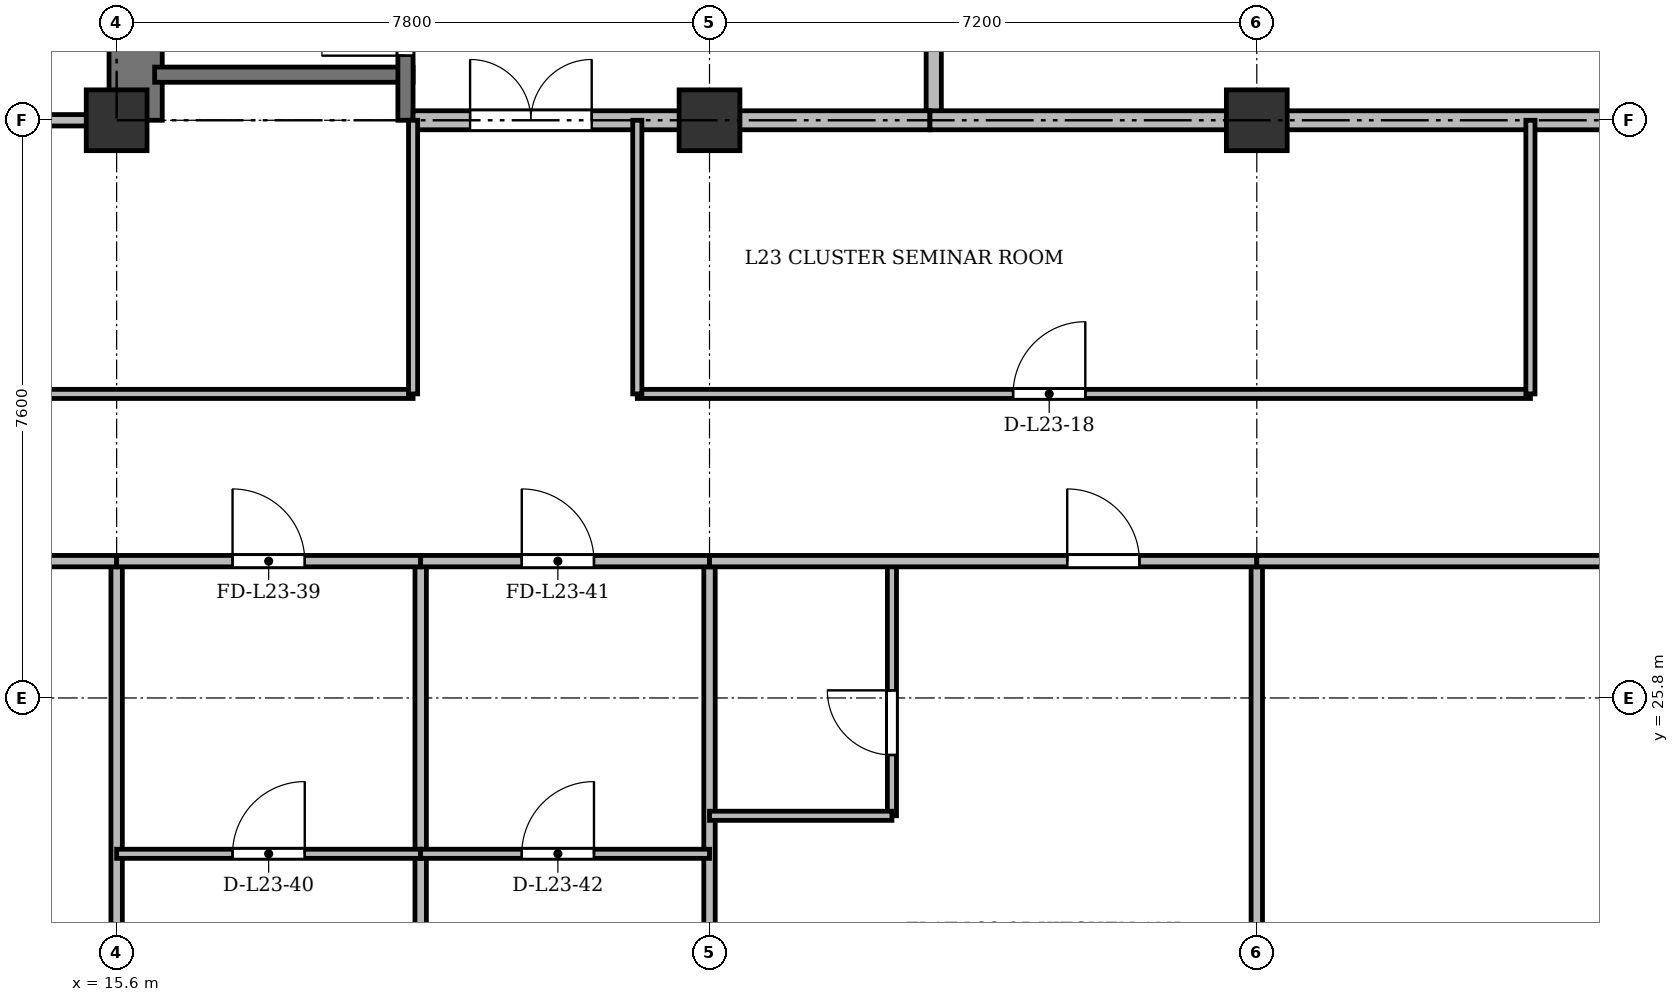
"""IFC4 building model, lengths in metres.
Left out: names, types, materials, properties, quantities, classifications, styles, units other than length and angle.
Written with IfcOpenShell. Run it as: python <this file> out.ifc"""

import sys

from ifc_helpers import new_model, si_unit, direction, frame, frame_2d, origin, origin_2d, place, context, subcontext, project, spatial, rectangle, extrude, source, transform, mapped, element, fill, save


model = new_model("IFC4")
c1 = context("Model", 3, precision=1e-05, world=origin(), true_north=direction((0.0, 1.0)))
c2 = subcontext(c1, "Body", "Model", "MODEL_VIEW")
j1 = project(units=[si_unit("LENGTHUNIT", "METRE"), si_unit("PLANEANGLEUNIT", "RADIAN")], contexts=[c1])
p1 = place(None, origin())
s1 = spatial("IfcSite", under=j1, at=p1, CompositionType="ELEMENT")
p2 = place(p1, origin())
s2 = spatial("IfcBuilding", under=s1, at=p2, CompositionType="ELEMENT")
p3 = place(p2, frame((0.0, 0.0, 92.5)))
s3 = spatial("IfcBuildingStorey", under=s2, at=p3, CompositionType="ELEMENT", Elevation=92.5)
m1 = source(origin(), c2, "Body", "SweptSolid", [
    extrude(rectangle(XDim=0.8, YDim=0.8, at=origin_2d()), origin(), (0.0, 0.0, 1.0), 3.6),
])
for number, where, z_axis, x_axis in (
    (1, (15.6, 33.4, 0.0), (0.0, 0.0, 1.0), (1.0, 0.0, 0.0)),
    (2, (23.4, 33.4, 0.0), (0.0, 0.0, 1.0), (1.0, 0.0, 0.0)),
    (3, (30.6, 33.4, 0.0), (0.0, 0.0, 1.0), (1.0, 0.0, 0.0)),
):
    element("IfcColumn", number, at=place(p3, frame(where, z_axis=z_axis, x_axis=x_axis)), inside=s3, PredefinedType="COLUMN", context=c2, shape_type="MappedRepresentation", body=[
        mapped(m1, transform((0.0, 0.0, 0.0), x_axis=(1.0, 0.0, 0.0), y_axis=(0.0, 1.0, 0.0), z_axis=(0.0, 0.0, 1.0), scale=1.0)),
    ])
p4 = place(p3, frame((15.85, 33.4, 0.0), z_axis=(0.0, 0.0, 1.0), x_axis=(0.0, 1.0, 0.0)))
e4 = element("IfcWall", 4, at=p4, inside=s3, PredefinedType="SHEAR", context=c2, shape_type="SweptSolid", body=[
    extrude(rectangle(XDim=11.7, YDim=0.7, at=frame_2d((5.85, 0.0))), origin(), (0.0, 0.0, 1.0), 3.34),
])
p5 = place(p3, frame((16.1, 34.0, 0.0), z_axis=(0.0, 0.0, 1.0), x_axis=(1.0, 0.0, 0.0)))
e5 = element("IfcWall", 5, at=p5, inside=s3, PredefinedType="SHEAR", context=c2, shape_type="SweptSolid", body=[
    extrude(rectangle(XDim=3.4, YDim=0.2, at=frame_2d((1.7, 0.0))), origin(), (0.0, 0.0, 1.0), 3.34),
])
p6 = place(p3, frame((19.4, 33.4, 0.0), z_axis=(0.0, 0.0, 1.0), x_axis=(0.0, 1.0, 0.0)))
e6 = element("IfcWall", 6, at=p6, inside=s3, PredefinedType="SHEAR", context=c2, shape_type="SweptSolid", body=[
    extrude(rectangle(XDim=11.1, YDim=0.2, at=frame_2d((5.55, 0.0))), origin(), (0.0, 0.0, 1.0), 3.34),
])
p7 = place(p6, frame((0.85, 0.0, 0.0)))
e7 = element("IfcOpeningElement", 7, at=p7, cuts=e6, PredefinedType="OPENING", context=c2, shape_type="SweptSolid", body=[
    extrude(rectangle(XDim=1.1, YDim=2.15, at=frame_2d((0.55, 1.075))), frame((0.0, 0.11, 0.0), z_axis=(0.0, -1.0, 0.0), x_axis=(1.0, 0.0, 0.0)), (0.0, 0.0, 1.0), 0.22),
])
p8 = place(p3, frame((26.35, 33.4, 0.0), z_axis=(0.0, 0.0, 1.0), x_axis=(0.0, 1.0, 0.0)))
e8 = element("IfcWall", 8, at=p8, inside=s3, PredefinedType="SOLIDWALL", context=c2, shape_type="SweptSolid", body=[
    extrude(rectangle(XDim=11.3, YDim=0.2, at=frame_2d((5.65, 0.0))), origin(), (0.0, 0.0, 1.0), 2.752),
])
p9 = place(p3, frame((19.5, 33.4, 0.0), z_axis=(0.0, 0.0, 1.0), x_axis=(1.0, 0.0, 0.0)))
e9 = element("IfcWall", 9, at=p9, inside=s3, PredefinedType="PARTITIONING", context=c2, shape_type="SweptSolid", body=[
    extrude(rectangle(XDim=6.8, YDim=0.25, at=frame_2d((3.4, 0.0))), origin(), (0.0, 0.0, 1.0), 2.752),
])
p10 = place(p9, frame((0.75, 0.0, 0.0)))
e10 = element("IfcOpeningElement", 10, at=p10, cuts=e9, PredefinedType="OPENING", context=c2, shape_type="SweptSolid", body=[
    extrude(rectangle(XDim=1.6, YDim=2.2, at=frame_2d((0.8, 1.1))), frame((0.0, 0.135, 0.0), z_axis=(0.0, -1.0, 0.0), x_axis=(1.0, 0.0, 0.0)), (0.0, 0.0, 1.0), 0.27),
])
p11 = place(p3, frame((26.3, 33.4, 0.0), z_axis=(0.0, 0.0, 1.0), x_axis=(1.0, 0.0, 0.0)))
e11 = element("IfcWall", 11, at=p11, inside=s3, PredefinedType="PARTITIONING", context=c2, shape_type="SweptSolid", body=[
    extrude(rectangle(XDim=20.85, YDim=0.25, at=frame_2d((10.425, 0.0))), origin(), (0.0, 0.0, 1.0), 2.752),
])
p12 = place(p11, frame((9.2, 0.0, 0.0)))
e12 = element("IfcOpeningElement", 12, at=p12, cuts=e11, PredefinedType="OPENING", context=c2, shape_type="SweptSolid", body=[
    extrude(rectangle(XDim=1.6, YDim=2.2, at=frame_2d((0.8, 1.1))), frame((0.0, 0.135, 0.0), z_axis=(0.0, -1.0, 0.0), x_axis=(1.0, 0.0, 0.0)), (0.0, 0.0, 1.0), 0.27),
])
p13 = place(p3, frame((4.75, 29.8, 0.0), z_axis=(0.0, 0.0, 1.0), x_axis=(1.0, 0.0, 0.0)))
e13 = element("IfcWall", 13, at=p13, inside=s3, PredefinedType="PARTITIONING", context=c2, shape_type="SweptSolid", body=[
    extrude(rectangle(XDim=14.75, YDim=0.12, at=frame_2d((7.375, 0.0))), origin(), (0.0, 0.0, 1.0), 2.84),
])
p14 = place(p13, frame((6.9, 0.0, 0.0)))
e14 = element("IfcOpeningElement", 14, at=p14, cuts=e13, PredefinedType="OPENING", context=c2, shape_type="SweptSolid", body=[
    extrude(rectangle(XDim=0.95, YDim=2.15, at=frame_2d((0.475, 1.075))), frame((0.0, 0.07, 0.0), z_axis=(0.0, -1.0, 0.0), x_axis=(1.0, 0.0, 0.0)), (0.0, 0.0, 1.0), 0.14),
])
p15 = place(p3, frame((22.45, 29.8, 0.0), z_axis=(0.0, 0.0, 1.0), x_axis=(1.0, 0.0, 0.0)))
e15 = element("IfcWall", 15, at=p15, inside=s3, PredefinedType="PARTITIONING", context=c2, shape_type="SweptSolid", body=[
    extrude(rectangle(XDim=11.75, YDim=0.12, at=frame_2d((5.875, 0.0))), origin(), (0.0, 0.0, 1.0), 2.84),
])
p16 = place(p15, frame((4.944, 0.0, 0.0)))
e16 = element("IfcOpeningElement", 16, at=p16, cuts=e15, PredefinedType="OPENING", context=c2, shape_type="SweptSolid", body=[
    extrude(rectangle(XDim=0.95, YDim=2.15, at=frame_2d((0.475, 1.075))), frame((0.0, 0.07, 0.0), z_axis=(0.0, -1.0, 0.0), x_axis=(1.0, 0.0, 0.0)), (0.0, 0.0, 1.0), 0.14),
])
for number, where, z_axis, x_axis in (
    (17, (19.5, 29.8, 0.0), (0.0, 0.0, 1.0), (0.0, 1.0, 0.0)),
    (18, (22.45, 29.8, 0.0), (0.0, 0.0, 1.0), (0.0, 1.0, 0.0)),
    (19, (34.2, 29.8, 0.0), (0.0, 0.0, 1.0), (0.0, 1.0, 0.0)),
):
    element("IfcWall", number, at=place(p3, frame(where, z_axis=z_axis, x_axis=x_axis)), inside=s3, PredefinedType="PARTITIONING", context=c2, shape_type="SweptSolid", body=[
        extrude(rectangle(XDim=3.6, YDim=0.12, at=frame_2d((1.8, 0.0))), origin(), (0.0, 0.0, 1.0), 2.752),
    ])
p17 = place(p3, frame((4.75, 33.4, 0.0), z_axis=(0.0, 0.0, 1.0), x_axis=(1.0, 0.0, 0.0)))
e20 = element("IfcWall", 20, at=p17, inside=s3, PredefinedType="PARTITIONING", context=c2, shape_type="SweptSolid", body=[
    extrude(rectangle(XDim=10.85, YDim=0.15, at=frame_2d((5.425, 0.0))), origin(), (0.0, 0.0, 1.0), 2.752),
])
p18 = place(p17, frame((6.025, 0.0, 0.0)))
e21 = element("IfcOpeningElement", 21, at=p18, cuts=e20, PredefinedType="OPENING", context=c2, shape_type="SweptSolid", body=[
    extrude(rectangle(XDim=0.95, YDim=2.15, at=frame_2d((0.475, 1.075))), frame((0.0, 0.085, 0.0), z_axis=(0.0, -1.0, 0.0), x_axis=(1.0, 0.0, 0.0)), (0.0, 0.0, 1.0), 0.17),
])
p19 = place(p3, frame((15.6, 3.145, 0.0), z_axis=(0.0, 0.0, 1.0), x_axis=(0.0, 1.0, 0.0)))
e22 = element("IfcWall", 22, at=p19, inside=s3, PredefinedType="PARTITIONING", context=c2, shape_type="SweptSolid", body=[
    extrude(rectangle(XDim=24.455, YDim=0.15, at=frame_2d((12.228, 0.0))), origin(), (0.0, 0.0, 1.0), 2.84),
])
p20 = place(p3, frame((19.6, 3.145, 0.0), z_axis=(0.0, 0.0, 1.0), x_axis=(0.0, 1.0, 0.0)))
e23 = element("IfcWall", 23, at=p20, inside=s3, PredefinedType="PARTITIONING", context=c2, shape_type="SweptSolid", body=[
    extrude(rectangle(XDim=24.455, YDim=0.15, at=frame_2d((12.228, 0.0))), origin(), (0.0, 0.0, 1.0), 2.752),
])
for number, where, z_axis, x_axis in (
    (24, (23.4, 3.145, 0.0), (0.0, 0.0, 1.0), (0.0, 1.0, 0.0)),
    (25, (30.6, 3.145, 0.0), (0.0, 0.0, 1.0), (0.0, 1.0, 0.0)),
):
    element("IfcWall", number, at=place(p3, frame(where, z_axis=z_axis, x_axis=x_axis)), inside=s3, PredefinedType="PARTITIONING", context=c2, shape_type="SweptSolid", body=[
        extrude(rectangle(XDim=24.455, YDim=0.15, at=frame_2d((12.228, 0.0))), origin(), (0.0, 0.0, 1.0), 2.84),
    ])
p21 = place(p3, frame((8.8, 27.6, 0.0), z_axis=(0.0, 0.0, 1.0), x_axis=(1.0, 0.0, 0.0)))
e26 = element("IfcWall", 26, at=p21, inside=s3, PredefinedType="PARTITIONING", context=c2, shape_type="SweptSolid", body=[
    extrude(rectangle(XDim=6.8, YDim=0.15, at=frame_2d((3.4, 0.0))), origin(), (0.0, 0.0, 1.0), 2.84),
])
p22 = place(p21, frame((4.49, 0.0, 0.0)))
e27 = element("IfcOpeningElement", 27, at=p22, cuts=e26, PredefinedType="OPENING", context=c2, shape_type="SweptSolid", body=[
    extrude(rectangle(XDim=0.95, YDim=2.15, at=frame_2d((0.475, 1.075))), frame((0.0, 0.085, 0.0), z_axis=(0.0, -1.0, 0.0), x_axis=(1.0, 0.0, 0.0)), (0.0, 0.0, 1.0), 0.17),
])
p23 = place(p3, frame((15.6, 27.6, 0.0), z_axis=(0.0, 0.0, 1.0), x_axis=(1.0, 0.0, 0.0)))
e28 = element("IfcWall", 28, at=p23, inside=s3, PredefinedType="PARTITIONING", context=c2, shape_type="SweptSolid", body=[
    extrude(rectangle(XDim=4.0, YDim=0.15, at=frame_2d((2.0, 0.0))), origin(), (0.0, 0.0, 1.0), 2.84),
])
p24 = place(p23, frame((1.525, 0.0, 0.0)))
e29 = element("IfcOpeningElement", 29, at=p24, cuts=e28, PredefinedType="OPENING", context=c2, shape_type="SweptSolid", body=[
    extrude(rectangle(XDim=0.95, YDim=2.15, at=frame_2d((0.475, 1.075))), frame((0.0, 0.085, 0.0), z_axis=(0.0, -1.0, 0.0), x_axis=(1.0, 0.0, 0.0)), (0.0, 0.0, 1.0), 0.17),
])
p25 = place(p3, frame((15.6, 23.75, 0.0), z_axis=(0.0, 0.0, 1.0), x_axis=(1.0, 0.0, 0.0)))
e30 = element("IfcWall", 30, at=p25, inside=s3, PredefinedType="PARTITIONING", context=c2, shape_type="SweptSolid", body=[
    extrude(rectangle(XDim=4.0, YDim=0.12, at=frame_2d((2.0, 0.0))), origin(), (0.0, 0.0, 1.0), 2.84),
])
p26 = place(p25, frame((1.525, 0.0, 0.0)))
e31 = element("IfcOpeningElement", 31, at=p26, cuts=e30, PredefinedType="OPENING", context=c2, shape_type="SweptSolid", body=[
    extrude(rectangle(XDim=0.95, YDim=2.15, at=frame_2d((0.475, 1.075))), frame((0.0, 0.07, 0.0), z_axis=(0.0, -1.0, 0.0), x_axis=(1.0, 0.0, 0.0)), (0.0, 0.0, 1.0), 0.14),
])
p27 = place(p3, frame((19.6, 27.6, 0.0), z_axis=(0.0, 0.0, 1.0), x_axis=(1.0, 0.0, 0.0)))
e32 = element("IfcWall", 32, at=p27, inside=s3, PredefinedType="PARTITIONING", context=c2, shape_type="SweptSolid", body=[
    extrude(rectangle(XDim=3.8, YDim=0.15, at=frame_2d((1.9, 0.0))), origin(), (0.0, 0.0, 1.0), 2.84),
])
p28 = place(p27, frame((1.33, 0.0, 0.0)))
e33 = element("IfcOpeningElement", 33, at=p28, cuts=e32, PredefinedType="OPENING", context=c2, shape_type="SweptSolid", body=[
    extrude(rectangle(XDim=0.95, YDim=2.15, at=frame_2d((0.475, 1.075))), frame((0.0, 0.085, 0.0), z_axis=(0.0, -1.0, 0.0), x_axis=(1.0, 0.0, 0.0)), (0.0, 0.0, 1.0), 0.17),
])
p29 = place(p3, frame((19.6, 23.75, 0.0), z_axis=(0.0, 0.0, 1.0), x_axis=(1.0, 0.0, 0.0)))
e34 = element("IfcWall", 34, at=p29, inside=s3, PredefinedType="PARTITIONING", context=c2, shape_type="SweptSolid", body=[
    extrude(rectangle(XDim=3.8, YDim=0.12, at=frame_2d((1.9, 0.0))), origin(), (0.0, 0.0, 1.0), 2.84),
])
p30 = place(p29, frame((1.33, 0.0, 0.0)))
e35 = element("IfcOpeningElement", 35, at=p30, cuts=e34, PredefinedType="OPENING", context=c2, shape_type="SweptSolid", body=[
    extrude(rectangle(XDim=0.95, YDim=2.15, at=frame_2d((0.475, 1.075))), frame((0.0, 0.07, 0.0), z_axis=(0.0, -1.0, 0.0), x_axis=(1.0, 0.0, 0.0)), (0.0, 0.0, 1.0), 0.14),
])
p31 = place(p3, frame((25.8, 24.25, 0.0), z_axis=(0.0, 0.0, 1.0), x_axis=(0.0, 1.0, 0.0)))
e36 = element("IfcWall", 36, at=p31, inside=s3, PredefinedType="PARTITIONING", context=c2, shape_type="SweptSolid", body=[
    extrude(rectangle(XDim=3.35, YDim=0.12, at=frame_2d((1.675, 0.0))), origin(), (0.0, 0.0, 1.0), 2.99),
])
p32 = place(p31, frame((0.8, 0.0, 0.0)))
e37 = element("IfcOpeningElement", 37, at=p32, cuts=e36, PredefinedType="OPENING", context=c2, shape_type="SweptSolid", body=[
    extrude(rectangle(XDim=0.85, YDim=2.1, at=frame_2d((0.425, 1.05))), frame((0.0, 0.07, 0.0), z_axis=(0.0, -1.0, 0.0), x_axis=(1.0, 0.0, 0.0)), (0.0, 0.0, 1.0), 0.14),
])
p33 = place(p3, frame((23.4, 24.25, 0.0), z_axis=(0.0, 0.0, 1.0), x_axis=(1.0, 0.0, 0.0)))
e38 = element("IfcWall", 38, at=p33, inside=s3, PredefinedType="PARTITIONING", context=c2, shape_type="SweptSolid", body=[
    extrude(rectangle(XDim=2.4, YDim=0.12, at=frame_2d((1.2, 0.0))), origin(), (0.0, 0.0, 1.0), 2.84),
])
p34 = place(p3, frame((23.4, 27.6, 0.0), z_axis=(0.0, 0.0, 1.0), x_axis=(1.0, 0.0, 0.0)))
e39 = element("IfcWall", 39, at=p34, inside=s3, PredefinedType="PARTITIONING", context=c2, shape_type="SweptSolid", body=[
    extrude(rectangle(XDim=7.2, YDim=0.15, at=frame_2d((3.6, 0.0))), origin(), (0.0, 0.0, 1.0), 2.84),
])
p35 = place(p34, frame((4.706, 0.0, 0.0)))
e40 = element("IfcOpeningElement", 40, at=p35, cuts=e39, PredefinedType="OPENING", context=c2, shape_type="SweptSolid", body=[
    extrude(rectangle(XDim=0.95, YDim=2.15, at=frame_2d((0.475, 1.075))), frame((0.0, 0.085, 0.0), z_axis=(0.0, -1.0, 0.0), x_axis=(1.0, 0.0, 0.0)), (0.0, 0.0, 1.0), 0.17),
])
p36 = place(p3, frame((30.6, 27.6, 0.0), z_axis=(0.0, 0.0, 1.0), x_axis=(1.0, 0.0, 0.0)))
e41 = element("IfcWall", 41, at=p36, inside=s3, PredefinedType="PARTITIONING", context=c2, shape_type="SweptSolid", body=[
    extrude(rectangle(XDim=13.2, YDim=0.15, at=frame_2d((6.6, 0.0))), origin(), (0.0, 0.0, 1.0), 2.84),
])
p37 = place(p36, frame((5.8, 0.0, 0.0)))
e42 = element("IfcOpeningElement", 42, at=p37, cuts=e41, PredefinedType="OPENING", context=c2, shape_type="SweptSolid", body=[
    extrude(rectangle(XDim=1.6, YDim=2.2, at=frame_2d((0.8, 1.1))), frame((0.0, 0.085, 0.0), z_axis=(0.0, -1.0, 0.0), x_axis=(1.0, 0.0, 0.0)), (0.0, 0.0, 1.0), 0.17),
])
m2 = source(origin(), c2, "Body", "SweptSolid", [
    extrude(rectangle(XDim=1.1, YDim=2.15, at=frame_2d((0.55, 1.075))), frame((0.0, 0.025, 0.0), z_axis=(0.0, -1.0, 0.0), x_axis=(1.0, 0.0, 0.0)), (0.0, 0.0, 1.0), 0.05),
])
p38 = place(p7, origin())
e43 = element("IfcDoor", 43, at=p38, inside=s3, OperationType="SINGLE_SWING_LEFT", PredefinedType="DOOR", context=c2, shape_type="MappedRepresentation", body=[
    mapped(m2, transform((0.0, 0.0, 0.0), x_axis=(1.0, 0.0, 0.0), y_axis=(0.0, 1.0, 0.0), z_axis=(0.0, 0.0, 1.0), scale=1.0)),
])
fill(e7, e43)
m3 = source(origin(), c2, "Body", "SweptSolid", [
    extrude(rectangle(XDim=1.6, YDim=2.2, at=frame_2d((0.8, 1.1))), frame((0.0, 0.025, 0.0), z_axis=(0.0, -1.0, 0.0), x_axis=(1.0, 0.0, 0.0)), (0.0, 0.0, 1.0), 0.05),
])
p39 = place(p10, origin())
e44 = element("IfcDoor", 44, at=p39, inside=s3, OperationType="DOUBLE_DOOR_SINGLE_SWING", PredefinedType="DOOR", context=c2, shape_type="MappedRepresentation", body=[
    mapped(m3, transform((0.0, 0.0, 0.0), x_axis=(1.0, 0.0, 0.0), y_axis=(0.0, 1.0, 0.0), z_axis=(0.0, 0.0, 1.0), scale=1.0)),
])
fill(e10, e44)
m4 = source(origin(), c2, "Body", "SweptSolid", [
    extrude(rectangle(XDim=0.95, YDim=2.15, at=frame_2d((0.475, 1.075))), frame((0.0, 0.025, 0.0), z_axis=(0.0, -1.0, 0.0), x_axis=(1.0, 0.0, 0.0)), (0.0, 0.0, 1.0), 0.05),
])
p40 = place(p16, origin())
e45 = element("IfcDoor", 45, at=p40, inside=s3, OperationType="SINGLE_SWING_RIGHT", PredefinedType="DOOR", context=c2, shape_type="MappedRepresentation", body=[
    mapped(m4, transform((0.0, 0.0, 0.0), x_axis=(1.0, 0.0, 0.0), y_axis=(0.0, 1.0, 0.0), z_axis=(0.0, 0.0, 1.0), scale=1.0)),
])
fill(e16, e45)
p41 = place(p24, origin())
e46 = element("IfcDoor", 46, at=p41, inside=s3, OperationType="SINGLE_SWING_LEFT", PredefinedType="DOOR", context=c2, shape_type="MappedRepresentation", body=[
    mapped(m4, transform((0.0, 0.0, 0.0), x_axis=(1.0, 0.0, 0.0), y_axis=(0.0, 1.0, 0.0), z_axis=(0.0, 0.0, 1.0), scale=1.0)),
])
fill(e29, e46)
p42 = place(p26, origin())
e47 = element("IfcDoor", 47, at=p42, inside=s3, OperationType="SINGLE_SWING_RIGHT", PredefinedType="DOOR", context=c2, shape_type="MappedRepresentation", body=[
    mapped(m4, transform((0.0, 0.0, 0.0), x_axis=(1.0, 0.0, 0.0), y_axis=(0.0, 1.0, 0.0), z_axis=(0.0, 0.0, 1.0), scale=1.0)),
])
fill(e31, e47)
p43 = place(p28, origin())
e48 = element("IfcDoor", 48, at=p43, inside=s3, OperationType="SINGLE_SWING_LEFT", PredefinedType="DOOR", context=c2, shape_type="MappedRepresentation", body=[
    mapped(m4, transform((0.0, 0.0, 0.0), x_axis=(1.0, 0.0, 0.0), y_axis=(0.0, 1.0, 0.0), z_axis=(0.0, 0.0, 1.0), scale=1.0)),
])
fill(e33, e48)
p44 = place(p30, origin())
e49 = element("IfcDoor", 49, at=p44, inside=s3, OperationType="SINGLE_SWING_RIGHT", PredefinedType="DOOR", context=c2, shape_type="MappedRepresentation", body=[
    mapped(m4, transform((0.0, 0.0, 0.0), x_axis=(1.0, 0.0, 0.0), y_axis=(0.0, 1.0, 0.0), z_axis=(0.0, 0.0, 1.0), scale=1.0)),
])
fill(e35, e49)
m5 = source(origin(), c2, "Body", "SweptSolid", [
    extrude(rectangle(XDim=0.85, YDim=2.1, at=frame_2d((0.425, 1.05))), frame((0.0, 0.025, 0.0), z_axis=(0.0, -1.0, 0.0), x_axis=(1.0, 0.0, 0.0)), (0.0, 0.0, 1.0), 0.05),
])
p45 = place(p32, origin())
e50 = element("IfcDoor", 50, at=p45, inside=s3, OperationType="SINGLE_SWING_RIGHT", PredefinedType="DOOR", context=c2, shape_type="MappedRepresentation", body=[
    mapped(m5, transform((0.0, 0.0, 0.0), x_axis=(1.0, 0.0, 0.0), y_axis=(0.0, 1.0, 0.0), z_axis=(0.0, 0.0, 1.0), scale=1.0)),
])
fill(e37, e50)
p46 = place(p35, origin())
e51 = element("IfcDoor", 51, at=p46, inside=s3, OperationType="SINGLE_SWING_LEFT", PredefinedType="DOOR", context=c2, shape_type="MappedRepresentation", body=[
    mapped(m4, transform((0.0, 0.0, 0.0), x_axis=(1.0, 0.0, 0.0), y_axis=(0.0, 1.0, 0.0), z_axis=(0.0, 0.0, 1.0), scale=1.0)),
])
fill(e40, e51)
save(model, sys.argv[1])
